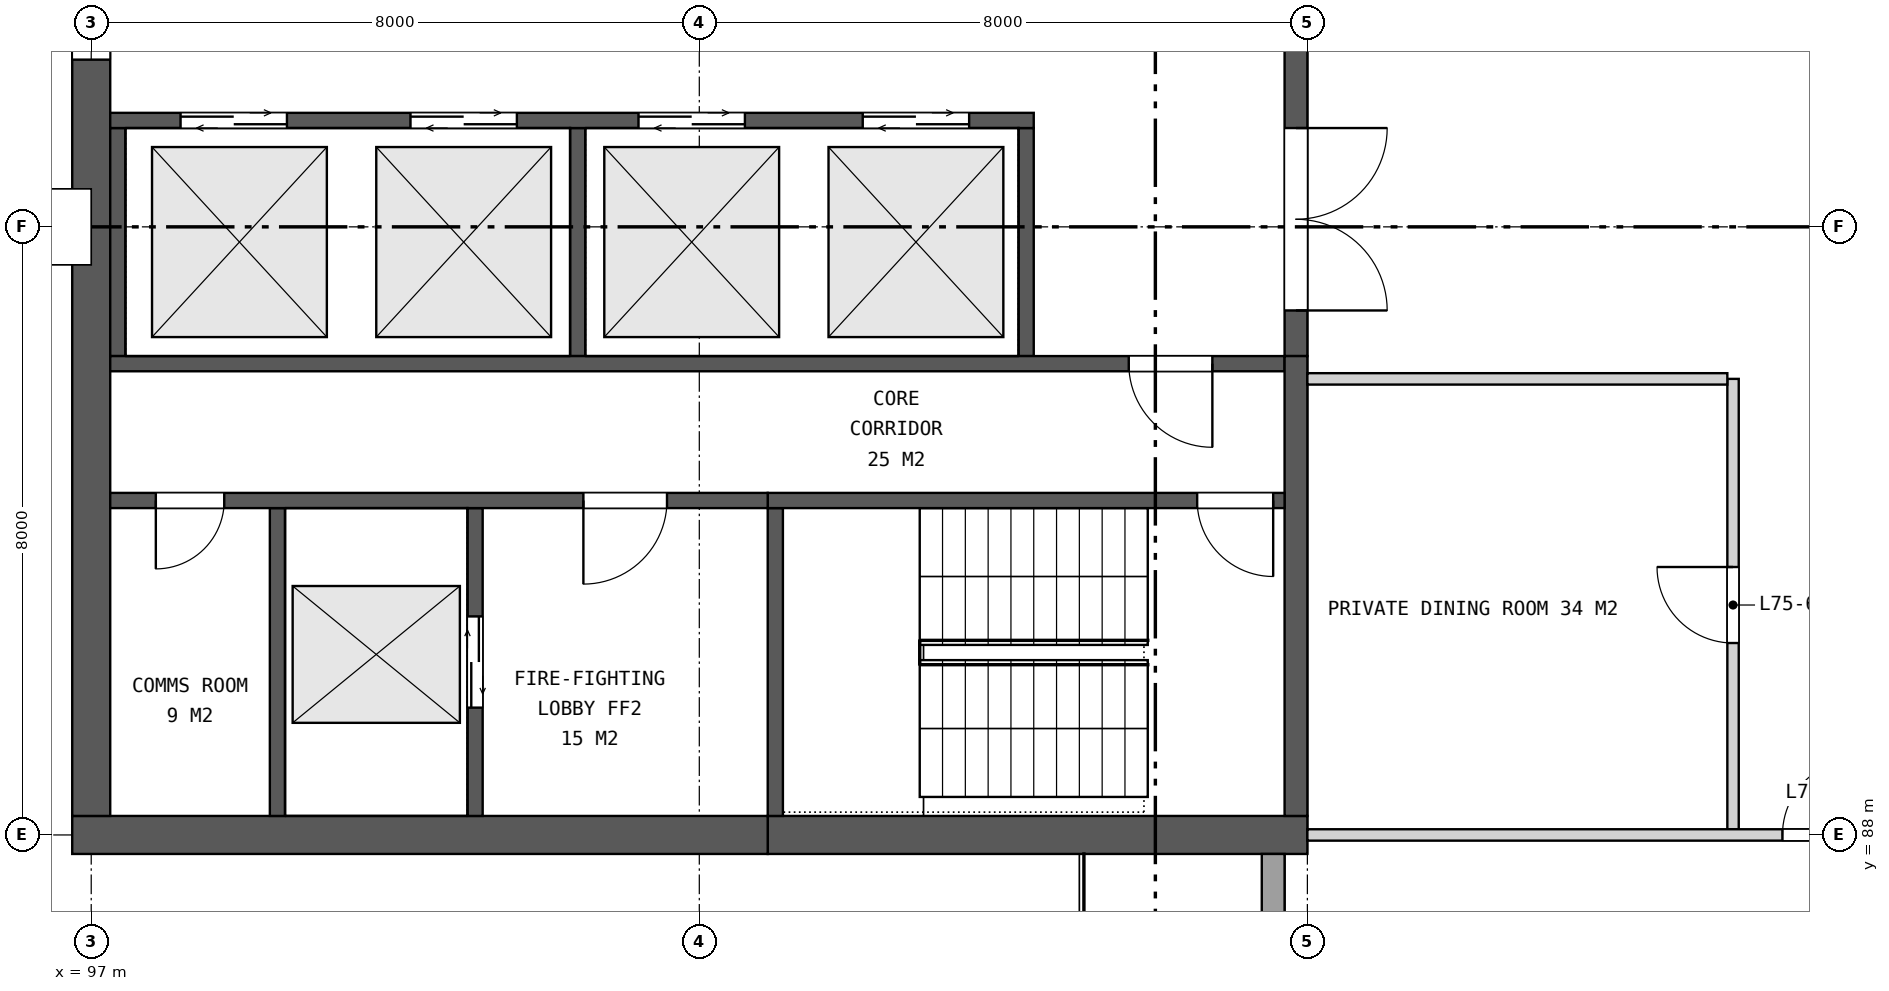
"""IFC4 building model, lengths in metres.
Left out: names, types, materials, properties, quantities, classifications, styles, units other than length and angle.
Written with IfcOpenShell. Run it as: python <this file> out.ifc"""

import sys

from ifc_helpers import new_model, si_unit, direction, frame, frame_2d, origin, place, context, subcontext, project, spatial, rectangle, extrude, element, fill, save


model = new_model("IFC4")
c1 = context("Model", 3, precision=1e-05, world=origin(), true_north=direction((0.0, 1.0)))
c2 = subcontext(c1, "Body", "Model", "MODEL_VIEW")
j1 = project(units=[si_unit("LENGTHUNIT", "METRE"), si_unit("PLANEANGLEUNIT", "RADIAN")], contexts=[c1])
p1 = place(None, origin())
s1 = spatial("IfcSite", under=j1, at=p1, CompositionType="ELEMENT")
p2 = place(p1, origin())
s2 = spatial("IfcBuilding", under=s1, at=p2, CompositionType="ELEMENT")
p3 = place(p2, frame((0.0, 0.0, 344.9)))
s3 = spatial("IfcBuildingStorey", under=s2, at=p3, CompositionType="ELEMENT", Elevation=344.9)
p4 = place(p3, frame((113.0, 88.0, 0.0), z_axis=(0.0, 0.0, 1.0), x_axis=(-1.0, 0.0, 0.0)))
e1 = element("IfcWall", 1, at=p4, inside=s3, PredefinedType="SHEAR", context=c2, shape_type="SweptSolid", body=[
    extrude(rectangle(XDim=7.1, YDim=0.5, at=frame_2d((3.55, 0.0))), origin(), (0.0, 0.0, 1.0), 4.2),
])
p5 = place(p3, frame((105.9, 88.0, 0.0), z_axis=(0.0, 0.0, 1.0), x_axis=(-1.0, 0.0, 0.0)))
e2 = element("IfcWall", 2, at=p5, inside=s3, PredefinedType="SHEAR", context=c2, shape_type="SweptSolid", body=[
    extrude(rectangle(XDim=9.15, YDim=0.5, at=frame_2d((4.575, 0.0))), origin(), (0.0, 0.0, 1.0), 4.2),
])
p6 = place(p3, frame((97.0, 111.75, 0.0), z_axis=(0.0, 0.0, 1.0), x_axis=(0.0, -1.0, 0.0)))
e3 = element("IfcWall", 3, at=p6, inside=s3, PredefinedType="SHEAR", context=c2, shape_type="SweptSolid", body=[
    extrude(rectangle(XDim=23.5, YDim=0.5, at=frame_2d((11.75, 0.0))), origin(), (0.0, 0.0, 1.0), 4.2),
])
p7 = place(p6, frame((9.95, 0.0, 0.15)))
e4 = element("IfcOpeningElement", 4, at=p7, cuts=e3, PredefinedType="OPENING", context=c2, shape_type="SweptSolid", body=[
    extrude(rectangle(XDim=3.6, YDim=3.0, at=frame_2d((1.8, 1.5))), frame((0.0, 0.26, 0.0), z_axis=(0.0, -1.0, 0.0), x_axis=(1.0, 0.0, 0.0)), (0.0, 0.0, 1.0), 0.52),
])
p8 = place(p3, frame((112.85, 105.7, 0.0), z_axis=(0.0, 0.0, 1.0), x_axis=(0.0, -1.0, 0.0)))
e5 = element("IfcWall", 5, at=p8, inside=s3, PredefinedType="SHEAR", context=c2, shape_type="SweptSolid", body=[
    extrude(rectangle(XDim=11.4, YDim=0.3, at=frame_2d((5.7, 0.0))), origin(), (0.0, 0.0, 1.0), 4.2),
])
p9 = place(p8, frame((0.6, 0.0, 0.0)))
e6 = element("IfcOpeningElement", 6, at=p9, cuts=e5, PredefinedType="OPENING", context=c2, shape_type="SweptSolid", body=[
    extrude(rectangle(XDim=2.4, YDim=2.4, at=frame_2d((1.2, 1.2))), frame((0.0, 0.16, 0.0), z_axis=(0.0, -1.0, 0.0), x_axis=(1.0, 0.0, 0.0)), (0.0, 0.0, 1.0), 0.32),
])
p10 = place(p8, frame((4.5, 0.0, 0.0)))
e7 = element("IfcOpeningElement", 7, at=p10, cuts=e5, PredefinedType="OPENING", context=c2, shape_type="SweptSolid", body=[
    extrude(rectangle(XDim=2.4, YDim=2.4, at=frame_2d((1.2, 1.2))), frame((0.0, 0.16, 0.0), z_axis=(0.0, -1.0, 0.0), x_axis=(1.0, 0.0, 0.0)), (0.0, 0.0, 1.0), 0.32),
])
p11 = place(p8, frame((8.4, 0.0, 0.0)))
e8 = element("IfcOpeningElement", 8, at=p11, cuts=e5, PredefinedType="OPENING", context=c2, shape_type="SweptSolid", body=[
    extrude(rectangle(XDim=2.4, YDim=2.4, at=frame_2d((1.2, 1.2))), frame((0.0, 0.16, 0.0), z_axis=(0.0, -1.0, 0.0), x_axis=(1.0, 0.0, 0.0)), (0.0, 0.0, 1.0), 0.32),
])
for number, where, z_axis, x_axis in (
    (9, (109.3, 97.3, 0.0), (0.0, 0.0, 1.0), (0.0, -1.0, 0.0)),
    (10, (103.4, 97.3, 0.0), (0.0, 0.0, 1.0), (0.0, -1.0, 0.0)),
    (11, (97.35, 97.3, 0.0), (0.0, 0.0, 1.0), (0.0, -1.0, 0.0)),
):
    element("IfcWall", number, at=place(p3, frame(where, z_axis=z_axis, x_axis=x_axis)), inside=s3, PredefinedType="SHEAR", context=c2, shape_type="SweptSolid", body=[
        extrude(rectangle(XDim=3.0, YDim=0.2, at=frame_2d((1.5, 0.0))), origin(), (0.0, 0.0, 1.0), 4.2),
    ])
p12 = place(p3, frame((109.4, 97.4, 0.0), z_axis=(0.0, 0.0, 1.0), x_axis=(-1.0, 0.0, 0.0)))
e12 = element("IfcWall", 12, at=p12, inside=s3, PredefinedType="SHEAR", context=c2, shape_type="SweptSolid", body=[
    extrude(rectangle(XDim=12.15, YDim=0.2, at=frame_2d((6.075, 0.0))), origin(), (0.0, 0.0, 1.0), 4.2),
])
p13 = place(p12, frame((0.85, 0.0, 0.0)))
e13 = element("IfcOpeningElement", 13, at=p13, cuts=e12, PredefinedType="OPENING", context=c2, shape_type="SweptSolid", body=[
    extrude(rectangle(XDim=1.4, YDim=2.1, at=frame_2d((0.7, 1.05))), frame((0.0, 0.11, 0.0), z_axis=(0.0, -1.0, 0.0), x_axis=(1.0, 0.0, 0.0)), (0.0, 0.0, 1.0), 0.22),
])
p14 = place(p12, frame((3.8, 0.0, 0.0)))
e14 = element("IfcOpeningElement", 14, at=p14, cuts=e12, PredefinedType="OPENING", context=c2, shape_type="SweptSolid", body=[
    extrude(rectangle(XDim=1.4, YDim=2.1, at=frame_2d((0.7, 1.05))), frame((0.0, 0.11, 0.0), z_axis=(0.0, -1.0, 0.0), x_axis=(1.0, 0.0, 0.0)), (0.0, 0.0, 1.0), 0.22),
])
p15 = place(p12, frame((6.8, 0.0, 0.0)))
e15 = element("IfcOpeningElement", 15, at=p15, cuts=e12, PredefinedType="OPENING", context=c2, shape_type="SweptSolid", body=[
    extrude(rectangle(XDim=1.4, YDim=2.1, at=frame_2d((0.7, 1.05))), frame((0.0, 0.11, 0.0), z_axis=(0.0, -1.0, 0.0), x_axis=(1.0, 0.0, 0.0)), (0.0, 0.0, 1.0), 0.22),
])
p16 = place(p12, frame((9.825, 0.0, 0.0)))
e16 = element("IfcOpeningElement", 16, at=p16, cuts=e12, PredefinedType="OPENING", context=c2, shape_type="SweptSolid", body=[
    extrude(rectangle(XDim=1.4, YDim=2.1, at=frame_2d((0.7, 1.05))), frame((0.0, 0.11, 0.0), z_axis=(0.0, -1.0, 0.0), x_axis=(1.0, 0.0, 0.0)), (0.0, 0.0, 1.0), 0.22),
])
p17 = place(p3, frame((112.7, 94.2, 0.0), z_axis=(0.0, 0.0, 1.0), x_axis=(-1.0, 0.0, 0.0)))
e17 = element("IfcWall", 17, at=p17, inside=s3, PredefinedType="SHEAR", context=c2, shape_type="SweptSolid", body=[
    extrude(rectangle(XDim=15.45, YDim=0.2, at=frame_2d((7.725, 0.0))), origin(), (0.0, 0.0, 1.0), 4.2),
])
p18 = place(p17, frame((0.95, 0.0, 0.0)))
e18 = element("IfcOpeningElement", 18, at=p18, cuts=e17, PredefinedType="OPENING", context=c2, shape_type="SweptSolid", body=[
    extrude(rectangle(XDim=1.1, YDim=2.1, at=frame_2d((0.55, 1.05))), frame((0.0, 0.11, 0.0), z_axis=(0.0, -1.0, 0.0), x_axis=(1.0, 0.0, 0.0)), (0.0, 0.0, 1.0), 0.22),
])
p19 = place(p3, frame((112.85, 94.3, 0.0), z_axis=(0.0, 0.0, 1.0), x_axis=(0.0, -1.0, 0.0)))
e19 = element("IfcWall", 19, at=p19, inside=s3, PredefinedType="SHEAR", context=c2, shape_type="SweptSolid", body=[
    extrude(rectangle(XDim=6.05, YDim=0.3, at=frame_2d((3.025, 0.0))), origin(), (0.0, 0.0, 1.0), 4.2),
])
p20 = place(p3, frame((106.0, 92.3, 0.0), z_axis=(0.0, 0.0, 1.0), x_axis=(0.0, -1.0, 0.0)))
e20 = element("IfcWall", 20, at=p20, inside=s3, PredefinedType="SHEAR", context=c2, shape_type="SweptSolid", body=[
    extrude(rectangle(XDim=4.05, YDim=0.2, at=frame_2d((2.025, 0.0))), origin(), (0.0, 0.0, 1.0), 4.2),
])
p21 = place(p3, frame((102.05, 92.3, 0.0), z_axis=(0.0, 0.0, 1.0), x_axis=(0.0, -1.0, 0.0)))
e21 = element("IfcWall", 21, at=p21, inside=s3, PredefinedType="SHEAR", context=c2, shape_type="SweptSolid", body=[
    extrude(rectangle(XDim=4.05, YDim=0.2, at=frame_2d((2.025, 0.0))), origin(), (0.0, 0.0, 1.0), 4.2),
])
p22 = place(p21, frame((1.425, 0.0, 0.0)))
e22 = element("IfcOpeningElement", 22, at=p22, cuts=e21, PredefinedType="OPENING", context=c2, shape_type="SweptSolid", body=[
    extrude(rectangle(XDim=1.2, YDim=2.1, at=frame_2d((0.6, 1.05))), frame((0.0, 0.11, 0.0), z_axis=(0.0, -1.0, 0.0), x_axis=(1.0, 0.0, 0.0)), (0.0, 0.0, 1.0), 0.22),
])
p23 = place(p3, frame((99.45, 92.3, 0.0), z_axis=(0.0, 0.0, 1.0), x_axis=(0.0, -1.0, 0.0)))
e23 = element("IfcWall", 23, at=p23, inside=s3, PredefinedType="SHEAR", context=c2, shape_type="SweptSolid", body=[
    extrude(rectangle(XDim=4.05, YDim=0.2, at=frame_2d((2.025, 0.0))), origin(), (0.0, 0.0, 1.0), 4.2),
])
p24 = place(p3, frame((112.7, 92.4, 0.0), z_axis=(0.0, 0.0, 1.0), x_axis=(-1.0, 0.0, 0.0)))
e24 = element("IfcWall", 24, at=p24, inside=s3, PredefinedType="SHEAR", context=c2, shape_type="SweptSolid", body=[
    extrude(rectangle(XDim=6.8, YDim=0.2, at=frame_2d((3.4, 0.0))), origin(), (0.0, 0.0, 1.0), 4.2),
])
p25 = place(p24, frame((0.15, 0.0, 0.0)))
e25 = element("IfcOpeningElement", 25, at=p25, cuts=e24, PredefinedType="OPENING", context=c2, shape_type="SweptSolid", body=[
    extrude(rectangle(XDim=1.0, YDim=2.1, at=frame_2d((0.5, 1.05))), frame((0.0, 0.11, 0.0), z_axis=(0.0, -1.0, 0.0), x_axis=(1.0, 0.0, 0.0)), (0.0, 0.0, 1.0), 0.22),
])
p26 = place(p3, frame((105.9, 92.4, 0.0), z_axis=(0.0, 0.0, 1.0), x_axis=(-1.0, 0.0, 0.0)))
e26 = element("IfcWall", 26, at=p26, inside=s3, PredefinedType="SHEAR", context=c2, shape_type="SweptSolid", body=[
    extrude(rectangle(XDim=8.65, YDim=0.2, at=frame_2d((4.325, 0.0))), origin(), (0.0, 0.0, 1.0), 4.2),
])
p27 = place(p26, frame((1.325, 0.0, 0.0)))
e27 = element("IfcOpeningElement", 27, at=p27, cuts=e26, PredefinedType="OPENING", context=c2, shape_type="SweptSolid", body=[
    extrude(rectangle(XDim=1.1, YDim=2.1, at=frame_2d((0.55, 1.05))), frame((0.0, 0.11, 0.0), z_axis=(0.0, -1.0, 0.0), x_axis=(1.0, 0.0, 0.0)), (0.0, 0.0, 1.0), 0.22),
])
p28 = place(p26, frame((7.15, 0.0, 0.0)))
e28 = element("IfcOpeningElement", 28, at=p28, cuts=e26, PredefinedType="OPENING", context=c2, shape_type="SweptSolid", body=[
    extrude(rectangle(XDim=0.9, YDim=2.1, at=frame_2d((0.45, 1.05))), frame((0.0, 0.11, 0.0), z_axis=(0.0, -1.0, 0.0), x_axis=(1.0, 0.0, 0.0)), (0.0, 0.0, 1.0), 0.22),
])
p29 = place(p3, frame((112.55, 87.75, 0.0), z_axis=(0.0, 0.0, 1.0), x_axis=(0.0, -1.0, 0.0)))
e29 = element("IfcWall", 29, at=p29, inside=s3, PredefinedType="SOLIDWALL", context=c2, shape_type="SweptSolid", body=[
    extrude(rectangle(XDim=7.712, YDim=0.3, at=frame_2d((3.856, 0.0))), origin(), (0.0, 0.0, 1.0), 3.85),
])
p30 = place(p29, frame((2.55, 0.0, 0.0)))
e30 = element("IfcOpeningElement", 30, at=p30, cuts=e29, PredefinedType="OPENING", context=c2, shape_type="SweptSolid", body=[
    extrude(rectangle(XDim=2.4, YDim=2.4, at=frame_2d((1.2, 1.2))), frame((0.0, 0.16, 0.0), z_axis=(0.0, -1.0, 0.0), x_axis=(1.0, 0.0, 0.0)), (0.0, 0.0, 1.0), 0.32),
])
p31 = place(p3, frame((118.6, 88.075, 0.0), z_axis=(0.0, 0.0, 1.0), x_axis=(0.0, 1.0, 0.0)))
e31 = element("IfcWall", 31, at=p31, inside=s3, PredefinedType="PARTITIONING", context=c2, shape_type="SweptSolid", body=[
    extrude(rectangle(XDim=5.925, YDim=0.15, at=frame_2d((2.962, 0.0))), origin(), (0.0, 0.0, 1.0), 3.396),
])
p32 = place(p31, frame((2.45, 0.0, 0.0)))
e32 = element("IfcOpeningElement", 32, at=p32, cuts=e31, PredefinedType="OPENING", context=c2, shape_type="SweptSolid", body=[
    extrude(rectangle(XDim=1.0, YDim=2.1, at=frame_2d((0.5, 1.05))), frame((0.0, 0.085, 0.0), z_axis=(0.0, -1.0, 0.0), x_axis=(1.0, 0.0, 0.0)), (0.0, 0.0, 1.0), 0.17),
])
p33 = place(p3, frame((113.0, 88.0, 0.0), z_axis=(0.0, 0.0, 1.0), x_axis=(1.0, 0.0, 0.0)))
e33 = element("IfcWall", 33, at=p33, inside=s3, PredefinedType="PARTITIONING", context=c2, shape_type="SweptSolid", body=[
    extrude(rectangle(XDim=24.0, YDim=0.15, at=frame_2d((12.0, 0.0))), origin(), (0.0, 0.0, 1.0), 3.396),
])
p34 = place(p33, frame((6.25, 0.0, 0.0)))
e34 = element("IfcOpeningElement", 34, at=p34, cuts=e33, PredefinedType="OPENING", context=c2, shape_type="SweptSolid", body=[
    extrude(rectangle(XDim=1.0, YDim=2.1, at=frame_2d((0.5, 1.05))), frame((0.0, 0.085, 0.0), z_axis=(0.0, -1.0, 0.0), x_axis=(1.0, 0.0, 0.0)), (0.0, 0.0, 1.0), 0.17),
])
p35 = place(p33, frame((16.65, 0.0, 0.0)))
e35 = element("IfcOpeningElement", 35, at=p35, cuts=e33, PredefinedType="OPENING", context=c2, shape_type="SweptSolid", body=[
    extrude(rectangle(XDim=1.0, YDim=2.1, at=frame_2d((0.5, 1.05))), frame((0.0, 0.085, 0.0), z_axis=(0.0, -1.0, 0.0), x_axis=(1.0, 0.0, 0.0)), (0.0, 0.0, 1.0), 0.17),
])
p36 = place(p3, frame((113.0, 94.0, 0.0), z_axis=(0.0, 0.0, 1.0), x_axis=(1.0, 0.0, 0.0)))
e36 = element("IfcWall", 36, at=p36, inside=s3, PredefinedType="PARTITIONING", context=c2, shape_type="SweptSolid", body=[
    extrude(rectangle(XDim=5.525, YDim=0.15, at=frame_2d((2.762, 0.0))), origin(), (0.0, 0.0, 1.0), 3.396),
])
p37 = place(p7, origin())
e37 = element("IfcWindow", 37, at=p37, inside=s3, PartitioningType="SINGLE_PANEL", PredefinedType="WINDOW", context=c2, shape_type="SweptSolid", body=[
    extrude(rectangle(XDim=3.6, YDim=3.0, at=frame_2d((1.8, 1.5))), frame((0.0, 0.03, 0.0), z_axis=(0.0, -1.0, 0.0), x_axis=(1.0, 0.0, 0.0)), (0.0, 0.0, 1.0), 0.06),
])
fill(e4, e37)
p38 = place(p11, origin())
e38 = element("IfcDoor", 38, at=p38, inside=s3, OperationType="DOUBLE_DOOR_SINGLE_SWING", PredefinedType="DOOR", context=c2, shape_type="SweptSolid", body=[
    extrude(rectangle(XDim=2.4, YDim=2.4, at=frame_2d((1.2, 1.2))), frame((0.0, 0.025, 0.0), z_axis=(0.0, -1.0, 0.0), x_axis=(1.0, 0.0, 0.0)), (0.0, 0.0, 1.0), 0.05),
])
fill(e8, e38)
p39 = place(p13, origin())
e39 = element("IfcDoor", 39, at=p39, inside=s3, OperationType="DOUBLE_DOOR_SLIDING", PredefinedType="DOOR", context=c2, shape_type="SweptSolid", body=[
    extrude(rectangle(XDim=1.4, YDim=2.1, at=frame_2d((0.7, 1.05))), frame((0.0, 0.025, 0.0), z_axis=(0.0, -1.0, 0.0), x_axis=(1.0, 0.0, 0.0)), (0.0, 0.0, 1.0), 0.05),
])
fill(e13, e39)
p40 = place(p14, origin())
e40 = element("IfcDoor", 40, at=p40, inside=s3, OperationType="DOUBLE_DOOR_SLIDING", PredefinedType="DOOR", context=c2, shape_type="SweptSolid", body=[
    extrude(rectangle(XDim=1.4, YDim=2.1, at=frame_2d((0.7, 1.05))), frame((0.0, 0.025, 0.0), z_axis=(0.0, -1.0, 0.0), x_axis=(1.0, 0.0, 0.0)), (0.0, 0.0, 1.0), 0.05),
])
fill(e14, e40)
p41 = place(p15, origin())
e41 = element("IfcDoor", 41, at=p41, inside=s3, OperationType="DOUBLE_DOOR_SLIDING", PredefinedType="DOOR", context=c2, shape_type="SweptSolid", body=[
    extrude(rectangle(XDim=1.4, YDim=2.1, at=frame_2d((0.7, 1.05))), frame((0.0, 0.025, 0.0), z_axis=(0.0, -1.0, 0.0), x_axis=(1.0, 0.0, 0.0)), (0.0, 0.0, 1.0), 0.05),
])
fill(e15, e41)
p42 = place(p16, origin())
e42 = element("IfcDoor", 42, at=p42, inside=s3, OperationType="DOUBLE_DOOR_SLIDING", PredefinedType="DOOR", context=c2, shape_type="SweptSolid", body=[
    extrude(rectangle(XDim=1.4, YDim=2.1, at=frame_2d((0.7, 1.05))), frame((0.0, 0.025, 0.0), z_axis=(0.0, -1.0, 0.0), x_axis=(1.0, 0.0, 0.0)), (0.0, 0.0, 1.0), 0.05),
])
fill(e16, e42)
p43 = place(p18, origin())
e43 = element("IfcDoor", 43, at=p43, inside=s3, OperationType="SINGLE_SWING_LEFT", PredefinedType="DOOR", context=c2, shape_type="SweptSolid", body=[
    extrude(rectangle(XDim=1.1, YDim=2.1, at=frame_2d((0.55, 1.05))), frame((0.0, 0.025, 0.0), z_axis=(0.0, -1.0, 0.0), x_axis=(1.0, 0.0, 0.0)), (0.0, 0.0, 1.0), 0.05),
])
fill(e18, e43)
p44 = place(p22, origin())
e44 = element("IfcDoor", 44, at=p44, inside=s3, OperationType="DOUBLE_DOOR_SLIDING", PredefinedType="DOOR", context=c2, shape_type="SweptSolid", body=[
    extrude(rectangle(XDim=1.2, YDim=2.1, at=frame_2d((0.6, 1.05))), frame((0.0, 0.025, 0.0), z_axis=(0.0, -1.0, 0.0), x_axis=(1.0, 0.0, 0.0)), (0.0, 0.0, 1.0), 0.05),
])
fill(e22, e44)
p45 = place(p25, origin())
e45 = element("IfcDoor", 45, at=p45, inside=s3, OperationType="SINGLE_SWING_LEFT", PredefinedType="DOOR", context=c2, shape_type="SweptSolid", body=[
    extrude(rectangle(XDim=1.0, YDim=2.1, at=frame_2d((0.5, 1.05))), frame((0.0, 0.025, 0.0), z_axis=(0.0, -1.0, 0.0), x_axis=(1.0, 0.0, 0.0)), (0.0, 0.0, 1.0), 0.05),
])
fill(e25, e45)
p46 = place(p27, origin())
e46 = element("IfcDoor", 46, at=p46, inside=s3, OperationType="SINGLE_SWING_RIGHT", PredefinedType="DOOR", context=c2, shape_type="SweptSolid", body=[
    extrude(rectangle(XDim=1.1, YDim=2.1, at=frame_2d((0.55, 1.05))), frame((0.0, 0.025, 0.0), z_axis=(0.0, -1.0, 0.0), x_axis=(1.0, 0.0, 0.0)), (0.0, 0.0, 1.0), 0.05),
])
fill(e27, e46)
p47 = place(p28, origin())
e47 = element("IfcDoor", 47, at=p47, inside=s3, OperationType="SINGLE_SWING_RIGHT", PredefinedType="DOOR", context=c2, shape_type="SweptSolid", body=[
    extrude(rectangle(XDim=0.9, YDim=2.1, at=frame_2d((0.45, 1.05))), frame((0.0, 0.025, 0.0), z_axis=(0.0, -1.0, 0.0), x_axis=(1.0, 0.0, 0.0)), (0.0, 0.0, 1.0), 0.05),
])
fill(e28, e47)
p48 = place(p34, origin())
e48 = element("IfcDoor", 48, at=p48, inside=s3, OperationType="SINGLE_SWING_RIGHT", PredefinedType="DOOR", context=c2, shape_type="SweptSolid", body=[
    extrude(rectangle(XDim=1.0, YDim=2.1, at=frame_2d((0.5, 1.05))), frame((0.0, 0.025, 0.0), z_axis=(0.0, -1.0, 0.0), x_axis=(1.0, 0.0, 0.0)), (0.0, 0.0, 1.0), 0.05),
])
fill(e34, e48)
p49 = place(p32, origin())
e49 = element("IfcDoor", 49, at=p49, inside=s3, OperationType="SINGLE_SWING_RIGHT", PredefinedType="DOOR", context=c2, shape_type="SweptSolid", body=[
    extrude(rectangle(XDim=1.0, YDim=2.1, at=frame_2d((0.5, 1.05))), frame((0.0, 0.025, 0.0), z_axis=(0.0, -1.0, 0.0), x_axis=(1.0, 0.0, 0.0)), (0.0, 0.0, 1.0), 0.05),
])
fill(e32, e49)
save(model, sys.argv[1])
